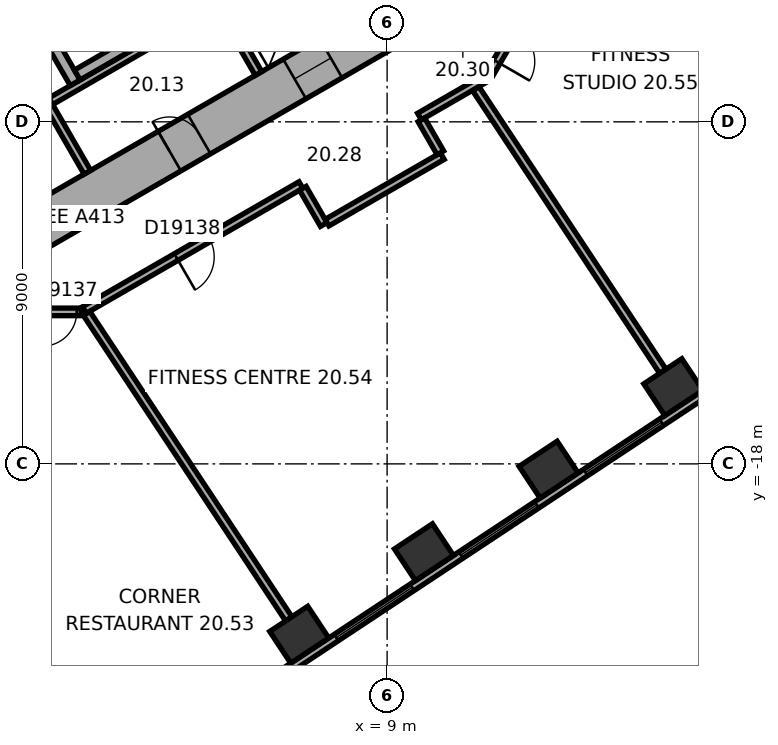
"""IFC4 building model, lengths in metres.
Left out: names, types, materials, properties, quantities, classifications, styles, units other than length and angle.
Written with IfcOpenShell. Run it as: python <this file> out.ifc"""

import sys

from ifc_helpers import new_model, si_unit, direction, frame, frame_2d, origin, origin_2d, place, context, subcontext, project, spatial, rectangle, extrude, element, fill, save


model = new_model("IFC4")
c1 = context("Model", 3, precision=1e-05, world=origin(), true_north=direction((0.0, 1.0)))
c2 = subcontext(c1, "Body", "Model", "MODEL_VIEW")
j1 = project(units=[si_unit("LENGTHUNIT", "METRE"), si_unit("PLANEANGLEUNIT", "RADIAN")], contexts=[c1])
p1 = place(None, origin())
s1 = spatial("IfcSite", under=j1, at=p1, CompositionType="ELEMENT")
p2 = place(p1, origin())
s2 = spatial("IfcBuilding", under=s1, at=p2, CompositionType="ELEMENT")
p3 = place(p2, frame((0.0, 0.0, 90.2)))
s3 = spatial("IfcBuildingStorey", under=s2, at=p3, CompositionType="ELEMENT", Elevation=90.2)
for number, where, z_axis, x_axis in (
    (1, (6.688, -22.496, 0.0), (0.0, 0.0, 1.0), (0.834, 0.552, 0.0)),
    (2, (9.969, -20.324, 0.0), (0.0, 0.0, 1.0), (0.834, 0.552, 0.0)),
    (3, (13.25, -18.152, 0.0), (0.0, 0.0, 1.0), (0.834, 0.552, 0.0)),
    (4, (16.531, -15.981, 0.0), (0.0, 0.0, 1.0), (0.834, 0.552, 0.0)),
):
    element("IfcColumn", number, at=place(p3, frame(where, z_axis=z_axis, x_axis=x_axis)), inside=s3, PredefinedType="COLUMN", context=c2, shape_type="SweptSolid", body=[
        extrude(rectangle(XDim=1.2, YDim=1.0, at=origin_2d()), origin(), (0.0, 0.0, 1.0), 3.3),
    ])
p4 = place(p3, frame((-10.4, -5.658, 0.0), z_axis=(0.0, 0.0, 1.0), x_axis=(0.866021384402, -0.500006961711, 0.0)))
e5 = element("IfcWall", 5, at=p4, inside=s3, PredefinedType="SHEAR", context=c2, shape_type="SweptSolid", body=[
    extrude(rectangle(XDim=12.355, YDim=1.2, at=frame_2d((6.178, 0.0))), origin(), (0.0, 0.0, 1.0), 3.3),
])
p5 = place(p4, frame((6.378, 0.0, 0.0)))
e6 = element("IfcOpeningElement", 6, at=p5, cuts=e5, PredefinedType="OPENING", context=c2, shape_type="SweptSolid", body=[
    extrude(rectangle(XDim=1.5, YDim=2.1, at=frame_2d((0.75, 1.05))), frame((0.0, 0.61, 0.0), z_axis=(0.0, -1.0, 0.0), x_axis=(1.0, 0.0, 0.0)), (0.0, 0.0, 1.0), 1.22),
])
p6 = place(p4, frame((3.228, 0.0, 0.0)))
e7 = element("IfcOpeningElement", 7, at=p6, cuts=e5, PredefinedType="OPENING", context=c2, shape_type="SweptSolid", body=[
    extrude(rectangle(XDim=0.9, YDim=2.1, at=frame_2d((0.45, 1.05))), frame((0.0, 0.61, 0.0), z_axis=(0.0, -1.0, 0.0), x_axis=(1.0, 0.0, 0.0)), (0.0, 0.0, 1.0), 1.22),
])
p7 = place(p3, frame((-0.3, -11.836, 0.0), z_axis=(0.0, 0.0, 1.0), x_axis=(0.866021384402, 0.500006961711, 0.0)))
e8 = element("IfcWall", 8, at=p7, inside=s3, PredefinedType="SHEAR", context=c2, shape_type="SweptSolid", body=[
    extrude(rectangle(XDim=12.355, YDim=1.2, at=frame_2d((6.178, 0.0))), origin(), (0.0, 0.0, 1.0), 3.3),
])
p8 = place(p7, frame((4.128, 0.0, 0.0)))
e9 = element("IfcOpeningElement", 9, at=p8, cuts=e8, PredefinedType="OPENING", context=c2, shape_type="SweptSolid", body=[
    extrude(rectangle(XDim=0.9, YDim=2.1, at=frame_2d((0.45, 1.05))), frame((0.0, 0.61, 0.0), z_axis=(0.0, -1.0, 0.0), x_axis=(1.0, 0.0, 0.0)), (0.0, 0.0, 1.0), 1.22),
])
p9 = place(p7, frame((7.928, 0.0, 0.0)))
e10 = element("IfcOpeningElement", 10, at=p9, cuts=e8, PredefinedType="OPENING", context=c2, shape_type="SweptSolid", body=[
    extrude(rectangle(XDim=1.1, YDim=2.1, at=frame_2d((0.55, 1.05))), frame((0.0, 0.61, 0.0), z_axis=(0.0, -1.0, 0.0), x_axis=(1.0, 0.0, 0.0)), (0.0, 0.0, 1.0), 1.22),
])
p10 = place(p3, frame((3.083, -25.601, 0.0), z_axis=(0.0, 0.0, 1.0), x_axis=(0.833884295743, 0.551939291329, 0.0)))
e11 = element("IfcWall", 11, at=p10, inside=s3, PredefinedType="STANDARD", context=c2, shape_type="SweptSolid", body=[
    extrude(rectangle(XDim=21.246, YDim=0.2, at=frame_2d((10.623, 0.0))), origin(), (0.0, 0.0, 1.0), 3.3),
])
p11 = place(p10, frame((1.553, 0.0, 0.8)))
e12 = element("IfcOpeningElement", 12, at=p11, cuts=e11, PredefinedType="OPENING", context=c2, shape_type="SweptSolid", body=[
    extrude(rectangle(XDim=2.4, YDim=1.7, at=frame_2d((1.2, 0.85))), frame((0.0, 0.11, 0.0), z_axis=(0.0, -1.0, 0.0), x_axis=(1.0, 0.0, 0.0)), (0.0, 0.0, 1.0), 0.22),
])
p12 = place(p10, frame((5.488, 0.0, 0.8)))
e13 = element("IfcOpeningElement", 13, at=p12, cuts=e11, PredefinedType="OPENING", context=c2, shape_type="SweptSolid", body=[
    extrude(rectangle(XDim=2.4, YDim=1.7, at=frame_2d((1.2, 0.85))), frame((0.0, 0.11, 0.0), z_axis=(0.0, -1.0, 0.0), x_axis=(1.0, 0.0, 0.0)), (0.0, 0.0, 1.0), 0.22),
])
p13 = place(p10, frame((9.422, 0.0, 0.8)))
e14 = element("IfcOpeningElement", 14, at=p13, cuts=e11, PredefinedType="OPENING", context=c2, shape_type="SweptSolid", body=[
    extrude(rectangle(XDim=2.4, YDim=1.7, at=frame_2d((1.2, 0.85))), frame((0.0, 0.11, 0.0), z_axis=(0.0, -1.0, 0.0), x_axis=(1.0, 0.0, 0.0)), (0.0, 0.0, 1.0), 0.22),
])
p14 = place(p10, frame((13.357, 0.0, 0.8)))
e15 = element("IfcOpeningElement", 15, at=p14, cuts=e11, PredefinedType="OPENING", context=c2, shape_type="SweptSolid", body=[
    extrude(rectangle(XDim=2.4, YDim=1.7, at=frame_2d((1.2, 0.85))), frame((0.0, 0.11, 0.0), z_axis=(0.0, -1.0, 0.0), x_axis=(1.0, 0.0, 0.0)), (0.0, 0.0, 1.0), 0.22),
])
p15 = place(p10, frame((17.291, 0.0, 0.8)))
e16 = element("IfcOpeningElement", 16, at=p15, cuts=e11, PredefinedType="OPENING", context=c2, shape_type="SweptSolid", body=[
    extrude(rectangle(XDim=2.4, YDim=1.7, at=frame_2d((1.2, 0.85))), frame((0.0, 0.11, 0.0), z_axis=(0.0, -1.0, 0.0), x_axis=(1.0, 0.0, 0.0)), (0.0, 0.0, 1.0), 0.22),
])
p16 = place(p3, frame((-0.024, -8.559, 0.0), z_axis=(0.0, 0.0, 1.0), x_axis=(0.866026010844, 0.49999894854, 0.0)))
e17 = element("IfcWall", 17, at=p16, inside=s3, PredefinedType="PARTITIONING", context=c2, shape_type="SweptSolid", body=[
    extrude(rectangle(XDim=8.0, YDim=0.2, at=frame_2d((4.0, 0.0))), origin(), (0.0, 0.0, 1.0), 3.05),
])
for number, where, z_axis, x_axis in (
    (18, (0.013, -8.422, 0.0), (0.0, 0.0, 1.0), (0.5, -0.866, 0.0)),
    (19, (4.516, -5.822, 0.0), (0.0, 0.0, 1.0), (0.5, -0.866, 0.0)),
):
    element("IfcWall", number, at=place(p3, frame(where, z_axis=z_axis, x_axis=x_axis)), inside=s3, PredefinedType="PARTITIONING", context=c2, shape_type="SweptSolid", body=[
        extrude(rectangle(XDim=2.2, YDim=0.2, at=frame_2d((1.1, 0.0))), origin(), (0.0, 0.0, 1.0), 3.05),
    ])
p17 = place(p3, frame((-1.558, -3.902, 0.0), z_axis=(0.0, 0.0, 1.0), x_axis=(0.499977259774, -0.866038532462, 0.0)))
e20 = element("IfcWall", 20, at=p17, inside=s3, PredefinedType="SHEAR", context=c2, shape_type="SweptSolid", body=[
    extrude(rectangle(XDim=4.7, YDim=0.3, at=frame_2d((2.35, 0.0))), origin(), (0.0, 0.0, 1.0), 3.05),
])
p18 = place(p17, frame((0.8, 0.0, 0.0)))
e21 = element("IfcOpeningElement", 21, at=p18, cuts=e20, PredefinedType="OPENING", context=c2, shape_type="SweptSolid", body=[
    extrude(rectangle(XDim=1.2, YDim=2.1, at=frame_2d((0.6, 1.05))), frame((0.0, 0.16, 0.0), z_axis=(0.0, -1.0, 0.0), x_axis=(1.0, 0.0, 0.0)), (0.0, 0.0, 1.0), 0.32),
])
p19 = place(p3, frame((0.847, -7.767, 0.0), z_axis=(0.0, 0.0, 1.0), x_axis=(0.866027801685, 0.499995846692, 0.0)))
e22 = element("IfcWall", 22, at=p19, inside=s3, PredefinedType="SHEAR", context=c2, shape_type="SweptSolid", body=[
    extrude(rectangle(XDim=7.06, YDim=0.3, at=frame_2d((3.53, 0.0))), origin(), (0.0, 0.0, 1.0), 3.05),
])
p20 = place(p3, frame((-0.186, -14.001, 0.0), z_axis=(0.0, 0.0, 1.0), x_axis=(1.0, 0.0, 0.0)))
e23 = element("IfcWall", 23, at=p20, inside=s3, PredefinedType="PARTITIONING", context=c2, shape_type="SweptSolid", body=[
    extrude(rectangle(XDim=1.136, YDim=0.2, at=frame_2d((0.568, 0.0))), origin(), (0.0, 0.0, 1.0), 3.05),
])
p21 = place(p20, frame((0.118, 0.0, 0.0)))
e24 = element("IfcOpeningElement", 24, at=p21, cuts=e23, PredefinedType="OPENING", context=c2, shape_type="SweptSolid", body=[
    extrude(rectangle(XDim=0.9, YDim=2.1, at=frame_2d((0.45, 1.05))), frame((0.0, 0.11, 0.0), z_axis=(0.0, -1.0, 0.0), x_axis=(1.0, 0.0, 0.0)), (0.0, 0.0, 1.0), 0.22),
])
p22 = place(p3, frame((1.033, -13.953, 0.0), z_axis=(0.0, 0.0, 1.0), x_axis=(0.866017531406, 0.500013635111, 0.0)))
e25 = element("IfcWall", 25, at=p22, inside=s3, PredefinedType="PARTITIONING", context=c2, shape_type="SweptSolid", body=[
    extrude(rectangle(XDim=6.58, YDim=0.2, at=frame_2d((3.29, 0.0))), origin(), (0.0, 0.0, 1.0), 3.05),
])
p23 = place(p22, frame((2.79, 0.0, 0.0)))
e26 = element("IfcOpeningElement", 26, at=p23, cuts=e25, PredefinedType="OPENING", context=c2, shape_type="SweptSolid", body=[
    extrude(rectangle(XDim=1.0, YDim=2.1, at=frame_2d((0.5, 1.05))), frame((0.0, 0.11, 0.0), z_axis=(0.0, -1.0, 0.0), x_axis=(1.0, 0.0, 0.0)), (0.0, 0.0, 1.0), 0.22),
])
p24 = place(p3, frame((6.412, -22.079, 0.0), z_axis=(0.0, 0.0, 1.0), x_axis=(-0.551919507115, 0.83389739037, 0.0)))
e27 = element("IfcWall", 27, at=p24, inside=s3, PredefinedType="PARTITIONING", context=c2, shape_type="SweptSolid", body=[
    extrude(rectangle(XDim=9.635, YDim=0.2, at=frame_2d((4.817, 0.0))), origin(), (0.0, 0.0, 1.0), 3.05),
])
p25 = place(p3, frame((6.782, -10.749, 0.0), z_axis=(0.0, 0.0, 1.0), x_axis=(0.500074377092, -0.865982457891, 0.0)))
e28 = element("IfcWall", 28, at=p25, inside=s3, PredefinedType="PARTITIONING", context=c2, shape_type="SweptSolid", body=[
    extrude(rectangle(XDim=1.101, YDim=0.2, at=frame_2d((0.55, 0.0))), origin(), (0.0, 0.0, 1.0), 3.05),
])
p26 = place(p3, frame((7.419, -11.653, 0.0), z_axis=(0.0, 0.0, 1.0), x_axis=(0.866038154057, 0.49997791523, 0.0)))
e29 = element("IfcWall", 29, at=p26, inside=s3, PredefinedType="PARTITIONING", context=c2, shape_type="SweptSolid", body=[
    extrude(rectangle(XDim=3.502, YDim=0.2, at=frame_2d((1.751, 0.0))), origin(), (0.0, 0.0, 1.0), 3.05),
])
p27 = place(p3, frame((9.852, -8.861, 0.0), z_axis=(0.0, 0.0, 1.0), x_axis=(0.866013291437, 0.500020978615, 0.0)))
e30 = element("IfcWall", 30, at=p27, inside=s3, PredefinedType="PARTITIONING", context=c2, shape_type="SweptSolid", body=[
    extrude(rectangle(XDim=2.077, YDim=0.2, at=frame_2d((1.038, 0.0))), origin(), (0.0, 0.0, 1.0), 3.05),
])
p28 = place(p3, frame((10.402, -9.815, 0.0), z_axis=(0.0, 0.0, 1.0), x_axis=(-0.499968756647, 0.866043441391, 0.0)))
e31 = element("IfcWall", 31, at=p28, inside=s3, PredefinedType="PARTITIONING", context=c2, shape_type="SweptSolid", body=[
    extrude(rectangle(XDim=1.001, YDim=0.2, at=frame_2d((0.5, 0.0))), origin(), (0.0, 0.0, 1.0), 3.05),
])
p29 = place(p3, frame((11.67, -7.788, 0.0), z_axis=(0.0, 0.0, 1.0), x_axis=(0.500063286585, 0.865988862174, 0.0)))
e32 = element("IfcWall", 32, at=p29, inside=s3, PredefinedType="PARTITIONING", context=c2, shape_type="SweptSolid", body=[
    extrude(rectangle(XDim=1.86, YDim=0.2, at=frame_2d((0.93, 0.0))), origin(), (0.0, 0.0, 1.0), 3.05),
])
p30 = place(p29, frame((0.43, 0.0, 0.0)))
e33 = element("IfcOpeningElement", 33, at=p30, cuts=e32, PredefinedType="OPENING", context=c2, shape_type="SweptSolid", body=[
    extrude(rectangle(XDim=1.0, YDim=2.1, at=frame_2d((0.5, 1.05))), frame((0.0, 0.11, 0.0), z_axis=(0.0, -1.0, 0.0), x_axis=(1.0, 0.0, 0.0)), (0.0, 0.0, 1.0), 0.22),
])
p31 = place(p3, frame((16.255, -15.564, 0.0), z_axis=(0.0, 0.0, 1.0), x_axis=(-0.55192208744, 0.833895682562, 0.0)))
e34 = element("IfcWall", 34, at=p31, inside=s3, PredefinedType="PARTITIONING", context=c2, shape_type="SweptSolid", body=[
    extrude(rectangle(XDim=8.913, YDim=0.2, at=frame_2d((4.457, 0.0))), origin(), (0.0, 0.0, 1.0), 2.6),
])
p32 = place(p12, origin())
e35 = element("IfcWindow", 35, at=p32, inside=s3, PartitioningType="SINGLE_PANEL", PredefinedType="WINDOW", context=c2, shape_type="SweptSolid", body=[
    extrude(rectangle(XDim=2.4, YDim=1.7, at=frame_2d((1.2, 0.85))), frame((0.0, 0.03, 0.0), z_axis=(0.0, -1.0, 0.0), x_axis=(1.0, 0.0, 0.0)), (0.0, 0.0, 1.0), 0.06),
])
fill(e13, e35)
p33 = place(p13, origin())
e36 = element("IfcWindow", 36, at=p33, inside=s3, PartitioningType="SINGLE_PANEL", PredefinedType="WINDOW", context=c2, shape_type="SweptSolid", body=[
    extrude(rectangle(XDim=2.4, YDim=1.7, at=frame_2d((1.2, 0.85))), frame((0.0, 0.03, 0.0), z_axis=(0.0, -1.0, 0.0), x_axis=(1.0, 0.0, 0.0)), (0.0, 0.0, 1.0), 0.06),
])
fill(e14, e36)
p34 = place(p14, origin())
e37 = element("IfcWindow", 37, at=p34, inside=s3, PartitioningType="SINGLE_PANEL", PredefinedType="WINDOW", context=c2, shape_type="SweptSolid", body=[
    extrude(rectangle(XDim=2.4, YDim=1.7, at=frame_2d((1.2, 0.85))), frame((0.0, 0.03, 0.0), z_axis=(0.0, -1.0, 0.0), x_axis=(1.0, 0.0, 0.0)), (0.0, 0.0, 1.0), 0.06),
])
fill(e15, e37)
p35 = place(p8, origin())
e38 = element("IfcDoor", 38, at=p35, inside=s3, OperationType="SINGLE_SWING_LEFT", PredefinedType="DOOR", context=c2, shape_type="SweptSolid", body=[
    extrude(rectangle(XDim=0.9, YDim=2.1, at=frame_2d((0.45, 1.05))), frame((0.0, 0.025, 0.0), z_axis=(0.0, -1.0, 0.0), x_axis=(1.0, 0.0, 0.0)), (0.0, 0.0, 1.0), 0.05),
])
fill(e9, e38)
p36 = place(p9, origin())
e39 = element("IfcDoor", 39, at=p36, inside=s3, OperationType="DOUBLE_DOOR_SLIDING", PredefinedType="DOOR", context=c2, shape_type="SweptSolid", body=[
    extrude(rectangle(XDim=1.1, YDim=2.1, at=frame_2d((0.55, 1.05))), frame((0.0, 0.025, 0.0), z_axis=(0.0, -1.0, 0.0), x_axis=(1.0, 0.0, 0.0)), (0.0, 0.0, 1.0), 0.05),
])
fill(e10, e39)
p37 = place(p21, origin())
e40 = element("IfcDoor", 40, at=p37, inside=s3, OperationType="SINGLE_SWING_LEFT", PredefinedType="DOOR", context=c2, shape_type="SweptSolid", body=[
    extrude(rectangle(XDim=0.9, YDim=2.1, at=frame_2d((0.45, 1.05))), frame((0.0, 0.025, 0.0), z_axis=(0.0, -1.0, 0.0), x_axis=(1.0, 0.0, 0.0)), (0.0, 0.0, 1.0), 0.05),
])
fill(e24, e40)
p38 = place(p23, origin())
e41 = element("IfcDoor", 41, at=p38, inside=s3, OperationType="SINGLE_SWING_LEFT", PredefinedType="DOOR", context=c2, shape_type="SweptSolid", body=[
    extrude(rectangle(XDim=1.0, YDim=2.1, at=frame_2d((0.5, 1.05))), frame((0.0, 0.025, 0.0), z_axis=(0.0, -1.0, 0.0), x_axis=(1.0, 0.0, 0.0)), (0.0, 0.0, 1.0), 0.05),
])
fill(e26, e41)
p39 = place(p30, origin())
e42 = element("IfcDoor", 42, at=p39, inside=s3, OperationType="SINGLE_SWING_LEFT", PredefinedType="DOOR", context=c2, shape_type="SweptSolid", body=[
    extrude(rectangle(XDim=1.0, YDim=2.1, at=frame_2d((0.5, 1.05))), frame((0.0, 0.025, 0.0), z_axis=(0.0, -1.0, 0.0), x_axis=(1.0, 0.0, 0.0)), (0.0, 0.0, 1.0), 0.05),
])
fill(e33, e42)
save(model, sys.argv[1])
